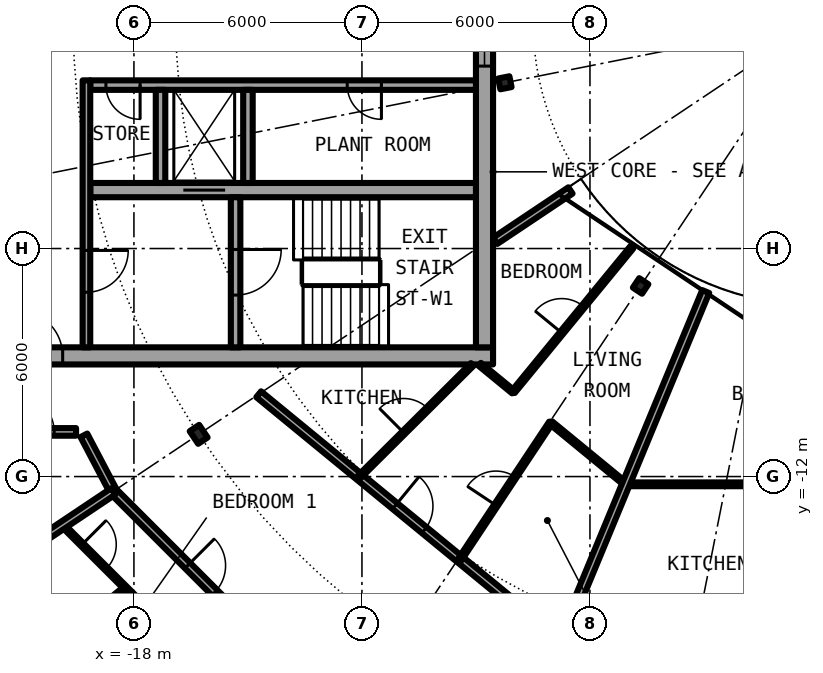
"""IFC4 building model, lengths in metres.
Left out: names, types, materials, properties, quantities, classifications, styles, units other than length and angle.
Written with IfcOpenShell. Run it as: python <this file> out.ifc"""

import sys

from ifc_helpers import new_model, si_unit, direction, frame, frame_2d, origin, origin_2d, place, context, subcontext, project, spatial, rectangle, i_section, extrude, element, fill, save


model = new_model("IFC4")
c1 = context("Model", 3, precision=1e-05, world=origin(), true_north=direction((0.0, 1.0)))
c2 = subcontext(c1, "Body", "Model", "MODEL_VIEW")
j1 = project(units=[si_unit("LENGTHUNIT", "METRE"), si_unit("PLANEANGLEUNIT", "RADIAN")], contexts=[c1])
p1 = place(None, origin())
s1 = spatial("IfcSite", under=j1, at=p1, CompositionType="ELEMENT")
p2 = place(p1, origin())
s2 = spatial("IfcBuilding", under=s1, at=p2, CompositionType="ELEMENT")
p3 = place(p2, frame((0.0, 0.0, 196.3)))
s3 = spatial("IfcBuildingStorey", under=s2, at=p3, CompositionType="ELEMENT", Elevation=196.3)
p4 = place(p3, frame((-16.297, -10.889, 0.0), z_axis=(0.0, 0.0, 1.0), x_axis=(-0.831469612303, -0.55557023302, 0.0)))
e1 = element("IfcColumn", 1, at=p4, inside=s3, PredefinedType="COLUMN", context=c2, shape_type="SweptSolid", body=[
    extrude(i_section(OverallWidth=0.3, OverallDepth=0.4, WebThickness=0.013, FlangeThickness=0.024, FilletRadius=0.027, at=origin_2d()), origin(), (0.0, 0.0, 1.0), 3.05),
])
for number, where, z_axis, x_axis in (
    (2, (-8.239, -1.639, 0.0), (0.0, 0.0, 1.0), (-0.981, -0.195, 0.0)),
    (3, (-4.667, -6.984, 0.0), (0.0, 0.0, 1.0), (-0.556, -0.831, 0.0)),
):
    element("IfcColumn", number, at=place(p3, frame(where, z_axis=z_axis, x_axis=x_axis)), inside=s3, PredefinedType="COLUMN", context=c2, shape_type="SweptSolid", body=[
        extrude(i_section(OverallWidth=0.3, OverallDepth=0.29, WebThickness=0.009, FlangeThickness=0.014, FilletRadius=0.027, at=origin_2d()), origin(), (0.0, 0.0, 1.0), 3.05),
    ])
p5 = place(p3, frame((-22.05, -8.825, 0.0), z_axis=(0.0, 0.0, 1.0), x_axis=(1.0, 0.0, 0.0)))
e4 = element("IfcWall", 4, at=p5, inside=s3, PredefinedType="SHEAR", context=c2, shape_type="SweptSolid", body=[
    extrude(rectangle(XDim=13.5, YDim=0.45, at=frame_2d((6.75, 0.0))), origin(), (0.0, 0.0, 1.0), 3.05),
])
p6 = place(p5, frame((0.975, 0.0, 0.0)))
e5 = element("IfcOpeningElement", 5, at=p6, cuts=e4, PredefinedType="OPENING", context=c2, shape_type="SweptSolid", body=[
    extrude(rectangle(XDim=1.2, YDim=2.3, at=frame_2d((0.6, 1.15))), frame((0.0, 0.235, 0.0), z_axis=(0.0, -1.0, 0.0), x_axis=(1.0, 0.0, 0.0)), (0.0, 0.0, 1.0), 0.47),
])
p7 = place(p3, frame((-8.775, 8.6, 0.0), z_axis=(0.0, 0.0, 1.0), x_axis=(0.0, -1.0, 0.0)))
e6 = element("IfcWall", 6, at=p7, inside=s3, PredefinedType="SHEAR", context=c2, shape_type="SweptSolid", body=[
    extrude(rectangle(XDim=17.2, YDim=0.45, at=frame_2d((8.6, 0.0))), origin(), (0.0, 0.0, 1.0), 3.05),
])
p8 = place(p7, frame((7.4, 0.0, 0.1)))
e7 = element("IfcOpeningElement", 7, at=p8, cuts=e6, PredefinedType="OPENING", context=c2, shape_type="SweptSolid", body=[
    extrude(rectangle(XDim=2.4, YDim=2.2, at=frame_2d((1.2, 1.1))), frame((0.0, 0.235, 0.0), z_axis=(0.0, -1.0, 0.0), x_axis=(1.0, 0.0, 0.0)), (0.0, 0.0, 1.0), 0.47),
])
p9 = place(p3, frame((-9.0, -1.7, 0.0), z_axis=(0.0, 0.0, 1.0), x_axis=(-1.0, 0.0, 0.0)))
e8 = element("IfcWall", 8, at=p9, inside=s3, PredefinedType="SHEAR", context=c2, shape_type="SweptSolid", body=[
    extrude(rectangle(XDim=10.15, YDim=0.25, at=frame_2d((5.075, 0.0))), origin(), (0.0, 0.0, 1.0), 3.05),
])
p10 = place(p9, frame((2.488, 0.0, 0.0)))
e9 = element("IfcOpeningElement", 9, at=p10, cuts=e8, PredefinedType="OPENING", context=c2, shape_type="SweptSolid", body=[
    extrude(rectangle(XDim=0.9, YDim=2.3, at=frame_2d((0.45, 1.15))), frame((0.0, 0.135, 0.0), z_axis=(0.0, -1.0, 0.0), x_axis=(1.0, 0.0, 0.0)), (0.0, 0.0, 1.0), 0.27),
])
p11 = place(p9, frame((8.837, 0.0, 0.0)))
e10 = element("IfcOpeningElement", 10, at=p11, cuts=e8, PredefinedType="OPENING", context=c2, shape_type="SweptSolid", body=[
    extrude(rectangle(XDim=0.9, YDim=2.3, at=frame_2d((0.45, 1.15))), frame((0.0, 0.135, 0.0), z_axis=(0.0, -1.0, 0.0), x_axis=(1.0, 0.0, 0.0)), (0.0, 0.0, 1.0), 0.27),
])
p12 = place(p3, frame((-9.0, -4.462, 0.0), z_axis=(0.0, 0.0, 1.0), x_axis=(-1.0, 0.0, 0.0)))
e11 = element("IfcWall", 11, at=p12, inside=s3, PredefinedType="SHEAR", context=c2, shape_type="SweptSolid", body=[
    extrude(rectangle(XDim=10.15, YDim=0.375, at=frame_2d((5.075, 0.0))), origin(), (0.0, 0.0, 1.0), 3.05),
])
p13 = place(p12, frame((6.6, 0.0, 0.0)))
e12 = element("IfcOpeningElement", 12, at=p13, cuts=e11, PredefinedType="OPENING", context=c2, shape_type="SweptSolid", body=[
    extrude(rectangle(XDim=1.1, YDim=2.3, at=frame_2d((0.55, 1.15))), frame((0.0, 0.198, 0.0), z_axis=(0.0, -1.0, 0.0), x_axis=(1.0, 0.0, 0.0)), (0.0, 0.0, 1.0), 0.395),
])
p14 = place(p3, frame((-15.325, -4.65, 0.0), z_axis=(0.0, 0.0, 1.0), x_axis=(0.0, -1.0, 0.0)))
e13 = element("IfcWall", 13, at=p14, inside=s3, PredefinedType="SHEAR", context=c2, shape_type="SweptSolid", body=[
    extrude(rectangle(XDim=3.95, YDim=0.25, at=frame_2d((1.975, 0.0))), origin(), (0.0, 0.0, 1.0), 3.05),
])
p15 = place(p14, frame((1.375, 0.0, 0.0)))
e14 = element("IfcOpeningElement", 14, at=p15, cuts=e13, PredefinedType="OPENING", context=c2, shape_type="SweptSolid", body=[
    extrude(rectangle(XDim=1.2, YDim=2.3, at=frame_2d((0.6, 1.15))), frame((0.0, 0.135, 0.0), z_axis=(0.0, -1.0, 0.0), x_axis=(1.0, 0.0, 0.0)), (0.0, 0.0, 1.0), 0.27),
])
for number, where, z_axis, x_axis in (
    (15, (-15.0, -1.825, 0.0), (0.0, 0.0, 1.0), (0.0, -1.0, 0.0)),
    (16, (-17.3, -1.825, 0.0), (0.0, 0.0, 1.0), (0.0, -1.0, 0.0)),
):
    element("IfcWall", number, at=place(p3, frame(where, z_axis=z_axis, x_axis=x_axis)), inside=s3, PredefinedType="SOLIDWALL", context=c2, shape_type="SweptSolid", body=[
        extrude(rectangle(XDim=2.45, YDim=0.25, at=frame_2d((1.225, 0.0))), origin(), (0.0, 0.0, 1.0), 2.7),
    ])
p16 = place(p3, frame((-19.25, -1.575, 0.0), z_axis=(0.0, 0.0, 1.0), x_axis=(0.0, -1.0, 0.0)))
e17 = element("IfcWall", 17, at=p16, inside=s3, PredefinedType="SOLIDWALL", context=c2, shape_type="SweptSolid", body=[
    extrude(rectangle(XDim=7.025, YDim=0.2, at=frame_2d((3.513, 0.0))), origin(), (0.0, 0.0, 1.0), 2.7),
])
p17 = place(p16, frame((4.475, 0.0, 0.0)))
e18 = element("IfcOpeningElement", 18, at=p17, cuts=e17, PredefinedType="OPENING", context=c2, shape_type="SweptSolid", body=[
    extrude(rectangle(XDim=1.1, YDim=2.3, at=frame_2d((0.55, 1.15))), frame((0.0, 0.11, 0.0), z_axis=(0.0, -1.0, 0.0), x_axis=(1.0, 0.0, 0.0)), (0.0, 0.0, 1.0), 0.22),
])
p18 = place(p3, frame((-19.869, -13.285, 0.0), z_axis=(0.0, 0.0, 1.0), x_axis=(0.707290020325, -0.706923494552, 0.0)))
e19 = element("IfcWall", 19, at=p18, inside=s3, PredefinedType="PARTITIONING", context=c2, shape_type="SweptSolid", body=[
    extrude(rectangle(XDim=4.663, YDim=0.1, at=frame_2d((2.331, 0.0))), origin(), (0.0, 0.0, 1.0), 2.7),
])
p19 = place(p18, frame((0.712, 0.0, 0.0)))
e20 = element("IfcOpeningElement", 20, at=p19, cuts=e19, PredefinedType="OPENING", context=c2, shape_type="SweptSolid", body=[
    extrude(rectangle(XDim=0.9, YDim=2.3, at=frame_2d((0.45, 1.15))), frame((0.0, 0.06, 0.0), z_axis=(0.0, -1.0, 0.0), x_axis=(1.0, 0.0, 0.0)), (0.0, 0.0, 1.0), 0.12),
])
p20 = place(p3, frame((-19.317, -10.915, 0.0), z_axis=(0.0, 0.0, 1.0), x_axis=(0.465359652486, -0.885121683068, 0.0)))
e21 = element("IfcWall", 21, at=p20, inside=s3, PredefinedType="PARTITIONING", context=c2, shape_type="SweptSolid", body=[
    extrude(rectangle(XDim=1.665, YDim=0.2, at=frame_2d((0.833, 0.0))), origin(), (0.0, 0.0, 1.0), 2.7),
])
p21 = place(p3, frame((-18.542, -12.389, 0.0), z_axis=(0.0, 0.0, 1.0), x_axis=(0.707106781187, -0.707106781187, 0.0)))
e22 = element("IfcWall", 22, at=p21, inside=s3, PredefinedType="PARTITIONING", context=c2, shape_type="SweptSolid", body=[
    extrude(rectangle(XDim=8.702, YDim=0.2, at=frame_2d((4.351, 0.0))), origin(), (0.0, 0.0, 1.0), 2.7),
])
p22 = place(p21, frame((2.763, 0.0, 0.0)))
e23 = element("IfcOpeningElement", 23, at=p22, cuts=e22, PredefinedType="OPENING", context=c2, shape_type="SweptSolid", body=[
    extrude(rectangle(XDim=1.0, YDim=2.3, at=frame_2d((0.5, 1.15))), frame((0.0, 0.11, 0.0), z_axis=(0.0, -1.0, 0.0), x_axis=(1.0, 0.0, 0.0)), (0.0, 0.0, 1.0), 0.22),
])
p23 = place(p3, frame((-14.717, -9.834, 0.0), z_axis=(0.0, 0.0, 1.0), x_axis=(0.773034536097, -0.634363938131, 0.0)))
e24 = element("IfcWall", 24, at=p23, inside=s3, PredefinedType="PARTITIONING", context=c2, shape_type="SweptSolid", body=[
    extrude(rectangle(XDim=10.277, YDim=0.2, at=frame_2d((5.138, 0.0))), origin(), (0.0, 0.0, 1.0), 2.7),
])
p24 = place(p23, frame((4.638, 0.0, 0.0)))
e25 = element("IfcOpeningElement", 25, at=p24, cuts=e24, PredefinedType="OPENING", context=c2, shape_type="SweptSolid", body=[
    extrude(rectangle(XDim=1.0, YDim=2.3, at=frame_2d((0.5, 1.15))), frame((0.0, 0.11, 0.0), z_axis=(0.0, -1.0, 0.0), x_axis=(1.0, 0.0, 0.0)), (0.0, 0.0, 1.0), 0.22),
])
p25 = place(p3, frame((-8.901, -9.047, 0.0), z_axis=(0.0, 0.0, 1.0), x_axis=(0.772786083133, -0.634666581534, 0.0)))
e26 = element("IfcWall", 26, at=p25, inside=s3, PredefinedType="PARTITIONING", context=c2, shape_type="SweptSolid", body=[
    extrude(rectangle(XDim=1.144, YDim=0.1, at=frame_2d((0.572, 0.0))), origin(), (0.0, 0.0, 1.0), 2.7),
])
p26 = place(p3, frame((-7.031, -10.582, 0.0), z_axis=(0.0, 0.0, 1.0), x_axis=(0.772943675046, -0.634474645046, 0.0)))
e27 = element("IfcWall", 27, at=p26, inside=s3, PredefinedType="PARTITIONING", context=c2, shape_type="SweptSolid", body=[
    extrude(rectangle(XDim=2.557, YDim=0.1, at=frame_2d((1.278, 0.0))), origin(), (0.0, 0.0, 1.0), 2.7),
])
p27 = place(p3, frame((-5.055, -12.204, 0.0), z_axis=(0.0, 0.0, 1.0), x_axis=(1.0, 0.0, 0.0)))
e28 = element("IfcWall", 28, at=p27, inside=s3, PredefinedType="PARTITIONING", context=c2, shape_type="SweptSolid", body=[
    extrude(rectangle(XDim=6.319, YDim=0.1, at=frame_2d((3.159, 0.0))), origin(), (0.0, 0.0, 1.0), 2.7),
])
p28 = place(p3, frame((-21.675, -10.825, 0.0), z_axis=(0.0, 0.0, 1.0), x_axis=(1.0, 0.0, 0.0)))
e29 = element("IfcWall", 29, at=p28, inside=s3, PredefinedType="PARTITIONING", context=c2, shape_type="SweptSolid", body=[
    extrude(rectangle(XDim=2.152, YDim=0.2, at=frame_2d((1.076, 0.0))), origin(), (0.0, 0.0, 1.0), 2.7),
])
p29 = place(p28, frame((0.576, 0.0, 0.0)))
e30 = element("IfcOpeningElement", 30, at=p29, cuts=e29, PredefinedType="OPENING", context=c2, shape_type="SweptSolid", body=[
    extrude(rectangle(XDim=1.0, YDim=2.3, at=frame_2d((0.5, 1.15))), frame((0.0, 0.11, 0.0), z_axis=(0.0, -1.0, 0.0), x_axis=(1.0, 0.0, 0.0)), (0.0, 0.0, 1.0), 0.22),
])
p30 = place(p3, frame((-6.513, -4.472, 0.0), z_axis=(0.0, 0.0, 1.0), x_axis=(-0.831403409976, -0.555669299026, 0.0)))
e31 = element("IfcWall", 31, at=p30, inside=s3, PredefinedType="PARTITIONING", context=c2, shape_type="SweptSolid", body=[
    extrude(rectangle(XDim=2.383, YDim=0.2, at=frame_2d((1.191, 0.0))), origin(), (0.0, 0.0, 1.0), 2.7),
])
p31 = place(p3, frame((-22.595, -15.098, 0.0), z_axis=(0.0, 0.0, 1.0), x_axis=(0.831387096605, 0.55569370664, 0.0)))
e32 = element("IfcWall", 32, at=p31, inside=s3, PredefinedType="PARTITIONING", context=c2, shape_type="SweptSolid", body=[
    extrude(rectangle(XDim=4.875, YDim=0.2, at=frame_2d((2.438, 0.0))), origin(), (0.0, 0.0, 1.0), 2.7),
])
p32 = place(p3, frame((-21.023, -17.22, 0.0), z_axis=(0.0, 0.0, 1.0), x_axis=(0.773548271597, 0.633737383709, 0.0)))
e33 = element("IfcWall", 33, at=p32, inside=s3, PredefinedType="PARTITIONING", context=c2, shape_type="SweptSolid", body=[
    extrude(rectangle(XDim=3.618, YDim=0.1, at=frame_2d((1.809, 0.0))), origin(), (0.0, 0.0, 1.0), 2.7),
])
p33 = place(p3, frame((-12.069, -12.007, 0.0), z_axis=(0.0, 0.0, 1.0), x_axis=(0.708909651863, 0.705299302067, 0.0)))
e34 = element("IfcWall", 34, at=p33, inside=s3, PredefinedType="PARTITIONING", context=c2, shape_type="SweptSolid", body=[
    extrude(rectangle(XDim=4.193, YDim=0.1, at=frame_2d((2.096, 0.0))), origin(), (0.0, 0.0, 1.0), 2.7),
])
p34 = place(p33, frame((1.646, 0.0, 0.0)))
e35 = element("IfcOpeningElement", 35, at=p34, cuts=e34, PredefinedType="OPENING", context=c2, shape_type="SweptSolid", body=[
    extrude(rectangle(XDim=0.9, YDim=2.3, at=frame_2d((0.45, 1.15))), frame((0.0, 0.06, 0.0), z_axis=(0.0, -1.0, 0.0), x_axis=(1.0, 0.0, 0.0)), (0.0, 0.0, 1.0), 0.12),
])
p35 = place(p3, frame((-9.421, -14.18, 0.0), z_axis=(0.0, 0.0, 1.0), x_axis=(0.553303732327, 0.832979579457, 0.0)))
e36 = element("IfcWall", 36, at=p35, inside=s3, PredefinedType="PARTITIONING", context=c2, shape_type="SweptSolid", body=[
    extrude(rectangle(XDim=4.319, YDim=0.1, at=frame_2d((2.16, 0.0))), origin(), (0.0, 0.0, 1.0), 2.7),
])
p36 = place(p35, frame((1.71, 0.0, 0.0)))
e37 = element("IfcOpeningElement", 37, at=p36, cuts=e36, PredefinedType="OPENING", context=c2, shape_type="SweptSolid", body=[
    extrude(rectangle(XDim=0.9, YDim=2.3, at=frame_2d((0.45, 1.15))), frame((0.0, 0.06, 0.0), z_axis=(0.0, -1.0, 0.0), x_axis=(1.0, 0.0, 0.0)), (0.0, 0.0, 1.0), 0.12),
])
p37 = place(p3, frame((-8.019, -9.771, 0.0), z_axis=(0.0, 0.0, 1.0), x_axis=(0.634401778971, 0.773003481776, 0.0)))
e38 = element("IfcWall", 38, at=p37, inside=s3, PredefinedType="PARTITIONING", context=c2, shape_type="SweptSolid", body=[
    extrude(rectangle(XDim=4.92, YDim=0.1, at=frame_2d((2.46, 0.0))), origin(), (0.0, 0.0, 1.0), 2.7),
])
p38 = place(p37, frame((2.01, 0.0, 0.0)))
e39 = element("IfcOpeningElement", 39, at=p38, cuts=e38, PredefinedType="OPENING", context=c2, shape_type="SweptSolid", body=[
    extrude(rectangle(XDim=0.9, YDim=2.3, at=frame_2d((0.45, 1.15))), frame((0.0, 0.06, 0.0), z_axis=(0.0, -1.0, 0.0), x_axis=(1.0, 0.0, 0.0)), (0.0, 0.0, 1.0), 0.12),
])
p39 = place(p3, frame((-6.774, -16.353, 0.0), z_axis=(0.0, 0.0, 1.0), x_axis=(0.382716169203, 0.92386597179, 0.0)))
e40 = element("IfcWall", 40, at=p39, inside=s3, PredefinedType="PARTITIONING", context=c2, shape_type="SweptSolid", body=[
    extrude(rectangle(XDim=9.981, YDim=0.2, at=frame_2d((4.99, 0.0))), origin(), (0.0, 0.0, 1.0), 2.7),
])
p40 = place(p13, origin())
e41 = element("IfcDoor", 41, at=p40, inside=s3, OperationType="DOUBLE_DOOR_SLIDING", PredefinedType="DOOR", context=c2, shape_type="SweptSolid", body=[
    extrude(rectangle(XDim=1.1, YDim=2.3, at=frame_2d((0.55, 1.15))), frame((0.0, 0.025, 0.0), z_axis=(0.0, -1.0, 0.0), x_axis=(1.0, 0.0, 0.0)), (0.0, 0.0, 1.0), 0.05),
])
fill(e12, e41)
p41 = place(p10, origin())
e42 = element("IfcDoor", 42, at=p41, inside=s3, OperationType="SINGLE_SWING_RIGHT", PredefinedType="DOOR", context=c2, shape_type="SweptSolid", body=[
    extrude(rectangle(XDim=0.9, YDim=2.3, at=frame_2d((0.45, 1.15))), frame((0.0, 0.025, 0.0), z_axis=(0.0, -1.0, 0.0), x_axis=(1.0, 0.0, 0.0)), (0.0, 0.0, 1.0), 0.05),
])
fill(e9, e42)
p42 = place(p11, origin())
e43 = element("IfcDoor", 43, at=p42, inside=s3, OperationType="SINGLE_SWING_LEFT", PredefinedType="DOOR", context=c2, shape_type="SweptSolid", body=[
    extrude(rectangle(XDim=0.9, YDim=2.3, at=frame_2d((0.45, 1.15))), frame((0.0, 0.025, 0.0), z_axis=(0.0, -1.0, 0.0), x_axis=(1.0, 0.0, 0.0)), (0.0, 0.0, 1.0), 0.05),
])
fill(e10, e43)
p43 = place(p15, origin())
e44 = element("IfcDoor", 44, at=p43, inside=s3, OperationType="SINGLE_SWING_LEFT", PredefinedType="DOOR", context=c2, shape_type="SweptSolid", body=[
    extrude(rectangle(XDim=1.2, YDim=2.3, at=frame_2d((0.6, 1.15))), frame((0.0, 0.025, 0.0), z_axis=(0.0, -1.0, 0.0), x_axis=(1.0, 0.0, 0.0)), (0.0, 0.0, 1.0), 0.05),
])
fill(e14, e44)
p44 = place(p17, origin())
e45 = element("IfcDoor", 45, at=p44, inside=s3, OperationType="SINGLE_SWING_LEFT", PredefinedType="DOOR", context=c2, shape_type="SweptSolid", body=[
    extrude(rectangle(XDim=1.1, YDim=2.3, at=frame_2d((0.55, 1.15))), frame((0.0, 0.025, 0.0), z_axis=(0.0, -1.0, 0.0), x_axis=(1.0, 0.0, 0.0)), (0.0, 0.0, 1.0), 0.05),
])
fill(e18, e45)
p45 = place(p6, origin())
e46 = element("IfcDoor", 46, at=p45, inside=s3, OperationType="SINGLE_SWING_RIGHT", PredefinedType="DOOR", context=c2, shape_type="SweptSolid", body=[
    extrude(rectangle(XDim=1.2, YDim=2.3, at=frame_2d((0.6, 1.15))), frame((0.0, 0.025, 0.0), z_axis=(0.0, -1.0, 0.0), x_axis=(1.0, 0.0, 0.0)), (0.0, 0.0, 1.0), 0.05),
])
fill(e5, e46)
p46 = place(p8, origin())
e47 = element("IfcWindow", 47, at=p46, inside=s3, PartitioningType="SINGLE_PANEL", PredefinedType="WINDOW", context=c2, shape_type="SweptSolid", body=[
    extrude(rectangle(XDim=2.4, YDim=2.2, at=frame_2d((1.2, 1.1))), frame((0.0, 0.03, 0.0), z_axis=(0.0, -1.0, 0.0), x_axis=(1.0, 0.0, 0.0)), (0.0, 0.0, 1.0), 0.06),
])
fill(e7, e47)
p47 = place(p22, origin())
e48 = element("IfcDoor", 48, at=p47, inside=s3, OperationType="SINGLE_SWING_LEFT", PredefinedType="DOOR", context=c2, shape_type="SweptSolid", body=[
    extrude(rectangle(XDim=1.0, YDim=2.3, at=frame_2d((0.5, 1.15))), frame((0.0, 0.025, 0.0), z_axis=(0.0, -1.0, 0.0), x_axis=(1.0, 0.0, 0.0)), (0.0, 0.0, 1.0), 0.05),
])
fill(e23, e48)
p48 = place(p19, origin())
e49 = element("IfcDoor", 49, at=p48, inside=s3, OperationType="SINGLE_SWING_LEFT", PredefinedType="DOOR", context=c2, shape_type="SweptSolid", body=[
    extrude(rectangle(XDim=0.9, YDim=2.3, at=frame_2d((0.45, 1.15))), frame((0.0, 0.025, 0.0), z_axis=(0.0, -1.0, 0.0), x_axis=(1.0, 0.0, 0.0)), (0.0, 0.0, 1.0), 0.05),
])
fill(e20, e49)
p49 = place(p24, origin())
e50 = element("IfcDoor", 50, at=p49, inside=s3, OperationType="SINGLE_SWING_LEFT", PredefinedType="DOOR", context=c2, shape_type="SweptSolid", body=[
    extrude(rectangle(XDim=1.0, YDim=2.3, at=frame_2d((0.5, 1.15))), frame((0.0, 0.025, 0.0), z_axis=(0.0, -1.0, 0.0), x_axis=(1.0, 0.0, 0.0)), (0.0, 0.0, 1.0), 0.05),
])
fill(e25, e50)
p50 = place(p36, origin())
e51 = element("IfcDoor", 51, at=p50, inside=s3, OperationType="SINGLE_SWING_RIGHT", PredefinedType="DOOR", context=c2, shape_type="SweptSolid", body=[
    extrude(rectangle(XDim=0.9, YDim=2.3, at=frame_2d((0.45, 1.15))), frame((0.0, 0.025, 0.0), z_axis=(0.0, -1.0, 0.0), x_axis=(1.0, 0.0, 0.0)), (0.0, 0.0, 1.0), 0.05),
])
fill(e37, e51)
p51 = place(p34, origin())
e52 = element("IfcDoor", 52, at=p51, inside=s3, OperationType="SINGLE_SWING_LEFT", PredefinedType="DOOR", context=c2, shape_type="SweptSolid", body=[
    extrude(rectangle(XDim=0.9, YDim=2.3, at=frame_2d((0.45, 1.15))), frame((0.0, 0.025, 0.0), z_axis=(0.0, -1.0, 0.0), x_axis=(1.0, 0.0, 0.0)), (0.0, 0.0, 1.0), 0.05),
])
fill(e35, e52)
p52 = place(p38, origin())
e53 = element("IfcDoor", 53, at=p52, inside=s3, OperationType="SINGLE_SWING_LEFT", PredefinedType="DOOR", context=c2, shape_type="SweptSolid", body=[
    extrude(rectangle(XDim=0.9, YDim=2.3, at=frame_2d((0.45, 1.15))), frame((0.0, 0.025, 0.0), z_axis=(0.0, -1.0, 0.0), x_axis=(1.0, 0.0, 0.0)), (0.0, 0.0, 1.0), 0.05),
])
fill(e39, e53)
p53 = place(p29, origin())
e54 = element("IfcDoor", 54, at=p53, inside=s3, OperationType="SINGLE_SWING_LEFT", PredefinedType="DOOR", context=c2, shape_type="SweptSolid", body=[
    extrude(rectangle(XDim=1.0, YDim=2.3, at=frame_2d((0.5, 1.15))), frame((0.0, 0.025, 0.0), z_axis=(0.0, -1.0, 0.0), x_axis=(1.0, 0.0, 0.0)), (0.0, 0.0, 1.0), 0.05),
])
fill(e30, e54)
save(model, sys.argv[1])
